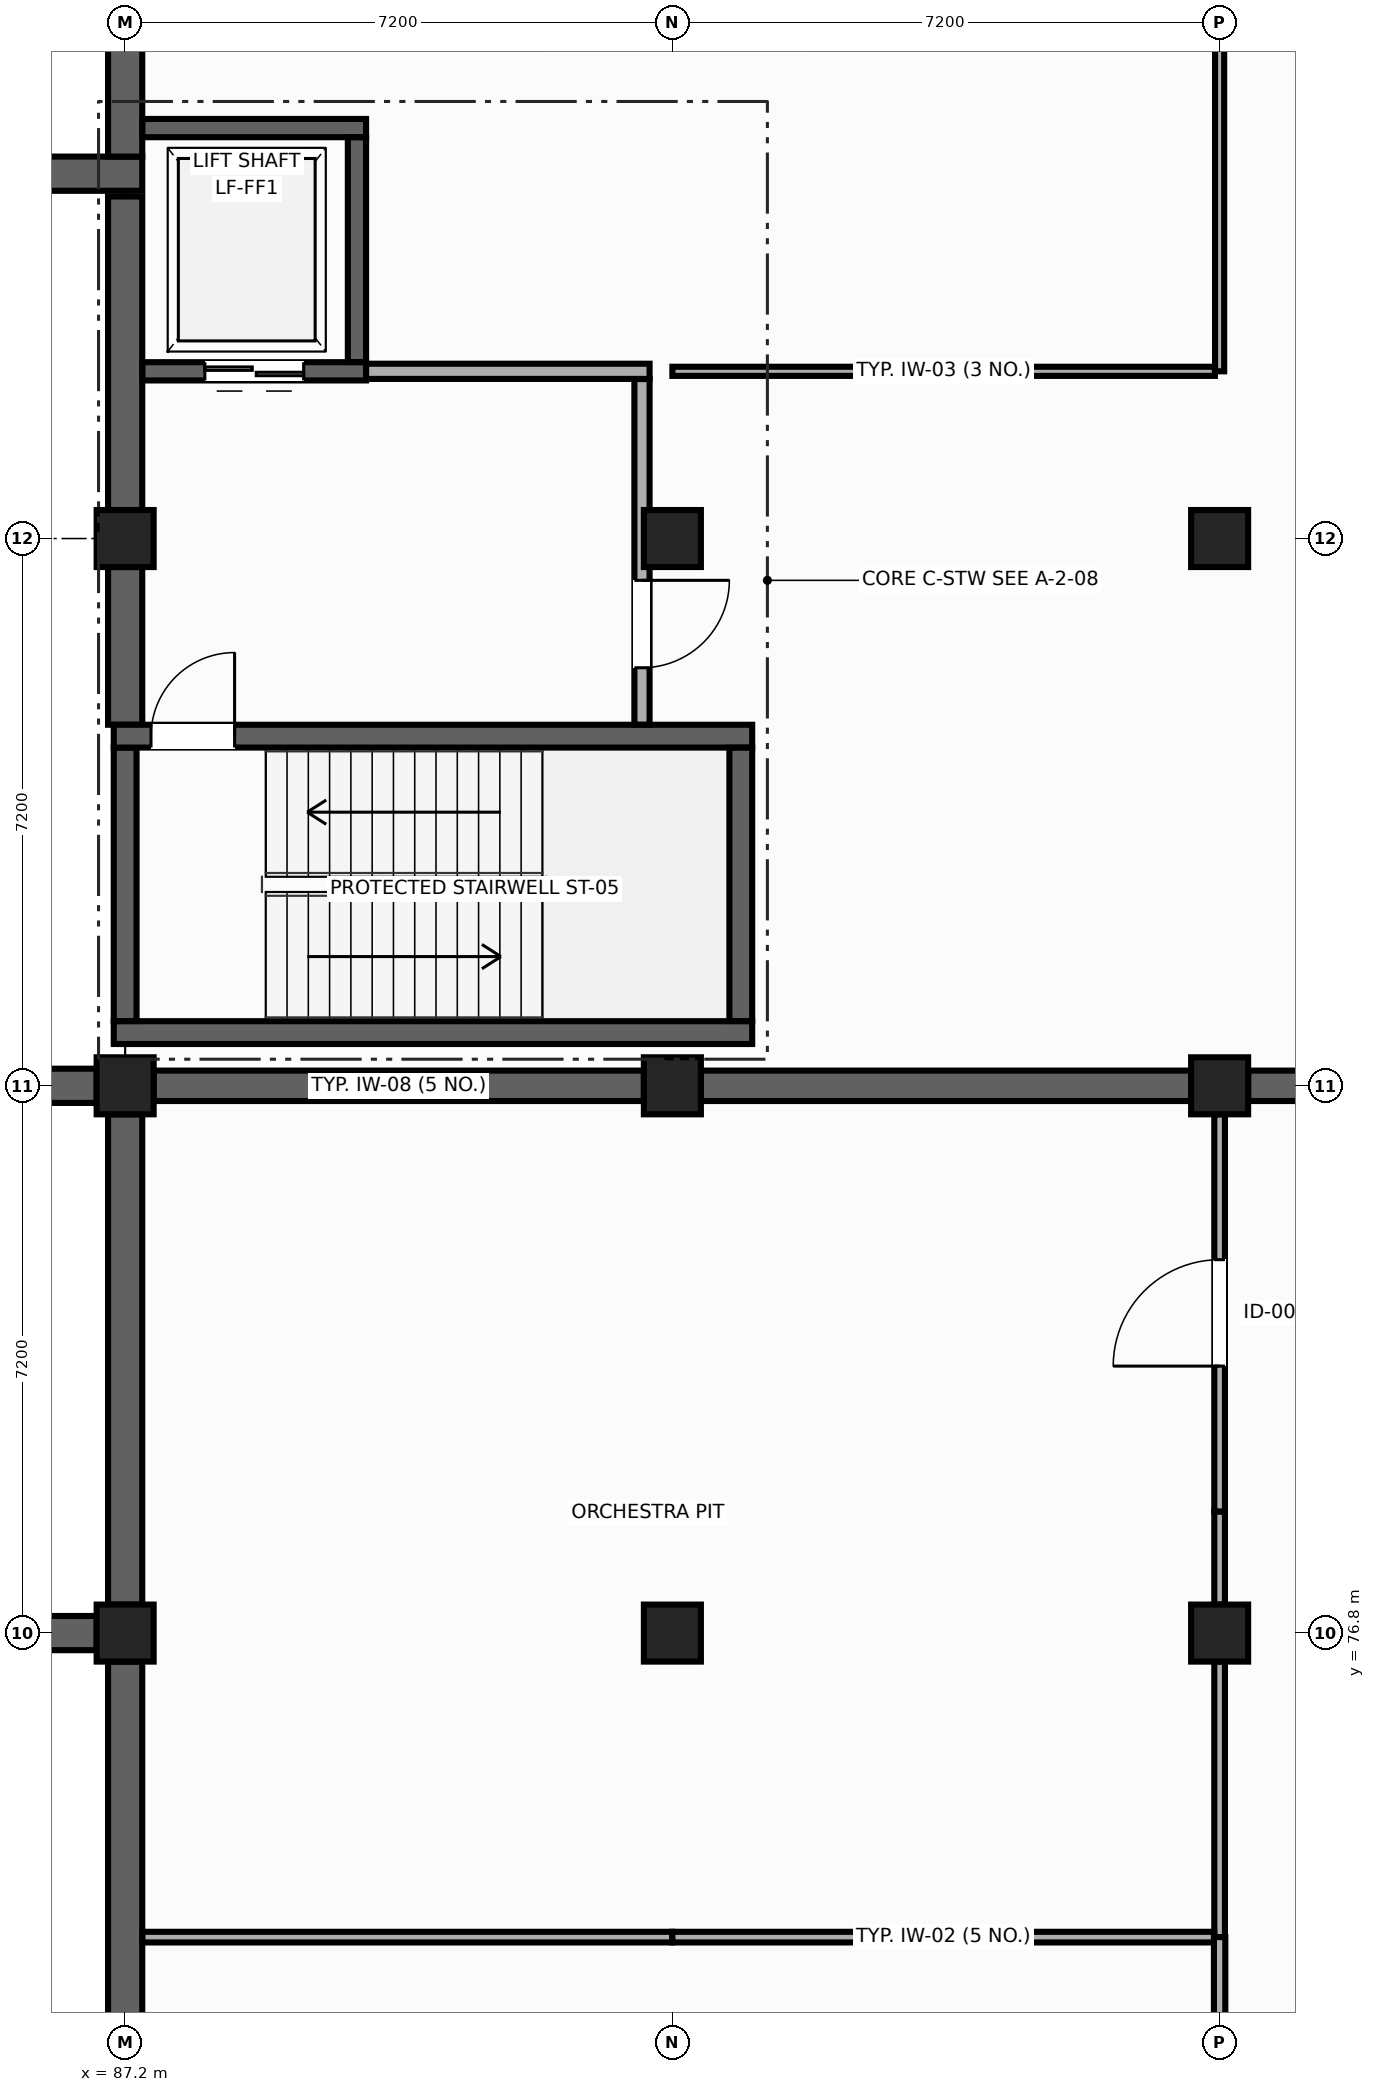
"""IFC4 building model, lengths in metres.
Left out: names, types, materials, properties, quantities, classifications, styles, units other than length and angle.
Written with IfcOpenShell. Run it as: python <this file> out.ifc"""

import sys

from ifc_helpers import new_model, si_unit, direction, frame, frame_2d, origin, origin_2d, place, context, subcontext, project, spatial, rectangle, extrude, element, fill, save


model = new_model("IFC4")
c1 = context("Model", 3, precision=1e-05, world=origin(), true_north=direction((0.0, 1.0)))
c2 = subcontext(c1, "Body", "Model", "MODEL_VIEW")
j1 = project(units=[si_unit("LENGTHUNIT", "METRE"), si_unit("PLANEANGLEUNIT", "RADIAN")], contexts=[c1])
p1 = place(None, origin())
s1 = spatial("IfcSite", under=j1, at=p1, CompositionType="ELEMENT")
p2 = place(p1, origin())
s2 = spatial("IfcBuilding", under=s1, at=p2, CompositionType="ELEMENT")
p3 = place(p2, frame((0.0, 0.0, -4.8)))
s3 = spatial("IfcBuildingStorey", under=s2, at=p3, CompositionType="ELEMENT", Elevation=-4.8)
p4 = place(p3, frame((87.2, 76.8, 0.0), z_axis=(0.0, 0.0, 1.0), x_axis=(1.0, 0.0, 0.0)))
e1 = element("IfcColumn", 1, at=p4, inside=s3, PredefinedType="COLUMN", context=c2, shape_type="SweptSolid", body=[
    extrude(rectangle(XDim=0.75, YDim=0.75, at=origin_2d()), origin(), (0.0, 0.0, 1.0), 4.8),
])
for number, where, z_axis, x_axis in (
    (2, (94.4, 76.8, 0.0), (0.0, 0.0, 1.0), (0.0, 1.0, 0.0)),
    (3, (101.6, 76.8, 0.0), (0.0, 0.0, 1.0), (1.0, 0.0, 0.0)),
):
    element("IfcColumn", number, at=place(p3, frame(where, z_axis=z_axis, x_axis=x_axis)), inside=s3, PredefinedType="COLUMN", context=c2, shape_type="SweptSolid", body=[
        extrude(rectangle(XDim=0.75, YDim=0.75, at=origin_2d()), origin(), (0.0, 0.0, 1.0), 4.45),
    ])
for number, where, z_axis, x_axis in (
    (4, (87.2, 84.0, 0.0), (0.0, 0.0, 1.0), (0.0, 1.0, 0.0)),
    (5, (94.4, 84.0, 0.0), (0.0, 0.0, 1.0), (1.0, 0.0, 0.0)),
    (6, (101.6, 84.0, 0.0), (0.0, 0.0, 1.0), (0.0, 1.0, 0.0)),
    (7, (87.2, 91.2, 0.0), (0.0, 0.0, 1.0), (1.0, 0.0, 0.0)),
):
    element("IfcColumn", number, at=place(p3, frame(where, z_axis=z_axis, x_axis=x_axis)), inside=s3, PredefinedType="COLUMN", context=c2, shape_type="SweptSolid", body=[
        extrude(rectangle(XDim=0.75, YDim=0.75, at=origin_2d()), origin(), (0.0, 0.0, 1.0), 4.8),
    ])
for number, where, z_axis, x_axis in (
    (8, (94.4, 91.2, 0.0), (0.0, 0.0, 1.0), (0.0, 1.0, 0.0)),
    (9, (101.6, 91.2, 0.0), (0.0, 0.0, 1.0), (1.0, 0.0, 0.0)),
):
    element("IfcColumn", number, at=place(p3, frame(where, z_axis=z_axis, x_axis=x_axis)), inside=s3, PredefinedType="COLUMN", context=c2, shape_type="SweptSolid", body=[
        extrude(rectangle(XDim=0.75, YDim=0.75, at=origin_2d()), origin(), (0.0, 0.0, 1.0), 4.42),
    ])
p5 = place(p3, frame((80.375, 76.8, 0.0), z_axis=(0.0, 0.0, 1.0), x_axis=(1.0, 0.0, 0.0)))
e10 = element("IfcWall", 10, at=p5, inside=s3, PredefinedType="SHEAR", context=c2, shape_type="SweptSolid", body=[
    extrude(rectangle(XDim=6.45, YDim=0.45, at=frame_2d((3.225, 0.0))), origin(), (0.0, 0.0, 1.0), 4.5),
])
p6 = place(p3, frame((87.2, 77.175, 0.0), z_axis=(0.0, 0.0, 1.0), x_axis=(0.0, 1.0, 0.0)))
e11 = element("IfcWall", 11, at=p6, inside=s3, PredefinedType="SHEAR", context=c2, shape_type="SweptSolid", body=[
    extrude(rectangle(XDim=6.45, YDim=0.45, at=frame_2d((3.225, 0.0))), origin(), (0.0, 0.0, 1.0), 4.45),
])
p7 = place(p3, frame((86.825, 84.0, 0.0), z_axis=(0.0, 0.0, 1.0), x_axis=(-1.0, 0.0, 0.0)))
e12 = element("IfcWall", 12, at=p7, inside=s3, PredefinedType="SHEAR", context=c2, shape_type="SweptSolid", body=[
    extrude(rectangle(XDim=4.65, YDim=0.45, at=frame_2d((2.325, 0.0))), origin(), (0.0, 0.0, 1.0), 4.55),
])
p8 = place(p3, frame((82.175, 96.0, 0.0), z_axis=(0.0, 0.0, 1.0), x_axis=(1.0, 0.0, 0.0)))
e13 = element("IfcWall", 13, at=p8, inside=s3, PredefinedType="SHEAR", context=c2, shape_type="SweptSolid", body=[
    extrude(rectangle(XDim=5.25, YDim=0.45, at=frame_2d((2.625, 0.0))), origin(), (0.0, 0.0, 1.0), 4.55),
])
p9 = place(p3, frame((87.2, 96.225, 0.0), z_axis=(0.0, 0.0, 1.0), x_axis=(0.0, 1.0, 0.0)))
e14 = element("IfcWall", 14, at=p9, inside=s3, PredefinedType="SHEAR", context=c2, shape_type="SweptSolid", body=[
    extrude(rectangle(XDim=1.8, YDim=0.45, at=frame_2d((0.9, 0.0))), origin(), (0.0, 0.0, 1.0), 4.42),
])
p10 = place(p3, frame((87.2, 69.975, 0.0), z_axis=(0.0, 0.0, 1.0), x_axis=(0.0, 1.0, 0.0)))
e15 = element("IfcWall", 15, at=p10, inside=s3, PredefinedType="SHEAR", context=c2, shape_type="SweptSolid", body=[
    extrude(rectangle(XDim=6.45, YDim=0.45, at=frame_2d((3.225, 0.0))), origin(), (0.0, 0.0, 1.0), 4.45),
])
p11 = place(p3, frame((87.2, 88.75, 0.0), z_axis=(0.0, 0.0, 1.0), x_axis=(0.0, 1.0, 0.0)))
e16 = element("IfcWall", 16, at=p11, inside=s3, PredefinedType="SHEAR", context=c2, shape_type="SweptSolid", body=[
    extrude(rectangle(XDim=2.075, YDim=0.45, at=frame_2d((1.038, 0.0))), origin(), (0.0, 0.0, 1.0), 4.42),
])
p12 = place(p3, frame((87.2, 91.575, 0.0), z_axis=(0.0, 0.0, 1.0), x_axis=(0.0, 1.0, 0.0)))
e17 = element("IfcWall", 17, at=p12, inside=s3, PredefinedType="SHEAR", context=c2, shape_type="SweptSolid", body=[
    extrude(rectangle(XDim=4.125, YDim=0.45, at=frame_2d((2.062, 0.0))), origin(), (0.0, 0.0, 1.0), 4.42),
])
p13 = place(p3, frame((95.45, 84.7, 0.0), z_axis=(0.0, 0.0, 1.0), x_axis=(-1.0, 0.0, 0.0)))
e18 = element("IfcWall", 18, at=p13, inside=s3, PredefinedType="SHEAR", context=c2, shape_type="SweptSolid", body=[
    extrude(rectangle(XDim=8.4, YDim=0.3, at=frame_2d((4.2, 0.0))), origin(), (0.0, 0.0, 1.0), 4.42),
])
p14 = place(p3, frame((87.2, 84.852, 0.0), z_axis=(0.0, 0.0, 1.0), x_axis=(0.0, 1.0, 0.0)))
e19 = element("IfcWall", 19, at=p14, inside=s3, PredefinedType="SHEAR", context=c2, shape_type="SweptSolid", body=[
    extrude(rectangle(XDim=3.598, YDim=0.3, at=frame_2d((1.799, 0.0))), origin(), (0.0, 0.0, 1.0), 4.42),
])
p15 = place(p3, frame((87.05, 88.6, 0.0), z_axis=(0.0, 0.0, 1.0), x_axis=(1.0, 0.0, 0.0)))
e20 = element("IfcWall", 20, at=p15, inside=s3, PredefinedType="SHEAR", context=c2, shape_type="SweptSolid", body=[
    extrude(rectangle(XDim=8.4, YDim=0.3, at=frame_2d((4.2, 0.0))), origin(), (0.0, 0.0, 1.0), 4.42),
])
p16 = place(p15, frame((0.49, 0.0, 0.0)))
e21 = element("IfcOpeningElement", 21, at=p16, cuts=e20, PredefinedType="OPENING", context=c2, shape_type="SweptSolid", body=[
    extrude(rectangle(XDim=1.1, YDim=2.15, at=frame_2d((0.55, 1.075))), frame((0.0, 0.16, 0.0), z_axis=(0.0, -1.0, 0.0), x_axis=(1.0, 0.0, 0.0)), (0.0, 0.0, 1.0), 0.32),
])
p17 = place(p3, frame((95.3, 88.448, 0.0), z_axis=(0.0, 0.0, 1.0), x_axis=(0.0, -1.0, 0.0)))
e22 = element("IfcWall", 22, at=p17, inside=s3, PredefinedType="SHEAR", context=c2, shape_type="SweptSolid", body=[
    extrude(rectangle(XDim=3.596, YDim=0.3, at=frame_2d((1.798, 0.0))), origin(), (0.0, 0.0, 1.0), 4.42),
])
p18 = place(p3, frame((90.37, 93.4, 0.0), z_axis=(0.0, 0.0, 1.0), x_axis=(-1.0, 0.0, 0.0)))
e23 = element("IfcWall", 23, at=p18, inside=s3, PredefinedType="SHEAR", context=c2, shape_type="SweptSolid", body=[
    extrude(rectangle(XDim=2.943, YDim=0.24, at=frame_2d((1.472, 0.0))), origin(), (0.0, 0.0, 1.0), 4.42),
])
p19 = place(p18, frame((0.822, 0.0, 0.0)))
e24 = element("IfcOpeningElement", 24, at=p19, cuts=e23, PredefinedType="OPENING", context=c2, shape_type="SweptSolid", body=[
    extrude(rectangle(XDim=1.3, YDim=2.15, at=frame_2d((0.65, 1.075))), frame((0.0, 0.13, 0.0), z_axis=(0.0, -1.0, 0.0), x_axis=(1.0, 0.0, 0.0)), (0.0, 0.0, 1.0), 0.26),
])
p20 = place(p3, frame((87.427, 96.6, 0.0), z_axis=(0.0, 0.0, 1.0), x_axis=(1.0, 0.0, 0.0)))
e25 = element("IfcWall", 25, at=p20, inside=s3, PredefinedType="SHEAR", context=c2, shape_type="SweptSolid", body=[
    extrude(rectangle(XDim=2.943, YDim=0.24, at=frame_2d((1.472, 0.0))), origin(), (0.0, 0.0, 1.0), 4.42),
])
p21 = place(p3, frame((90.25, 96.478, 0.0), z_axis=(0.0, 0.0, 1.0), x_axis=(0.0, -1.0, 0.0)))
e26 = element("IfcWall", 26, at=p21, inside=s3, PredefinedType="SHEAR", context=c2, shape_type="SweptSolid", body=[
    extrude(rectangle(XDim=2.956, YDim=0.24, at=frame_2d((1.478, 0.0))), origin(), (0.0, 0.0, 1.0), 4.42),
])
p22 = place(p3, frame((90.37, 93.4, 0.0), z_axis=(0.0, 0.0, 1.0), x_axis=(1.0, 0.0, 0.0)))
e27 = element("IfcWall", 27, at=p22, inside=s3, PredefinedType="PARTITIONING", context=c2, shape_type="SweptSolid", body=[
    extrude(rectangle(XDim=3.73, YDim=0.2, at=frame_2d((1.865, 0.0))), origin(), (0.0, 0.0, 1.0), 4.42),
])
p23 = place(p3, frame((94.0, 93.298, 0.0), z_axis=(0.0, 0.0, 1.0), x_axis=(0.0, -1.0, 0.0)))
e28 = element("IfcWall", 28, at=p23, inside=s3, PredefinedType="PARTITIONING", context=c2, shape_type="SweptSolid", body=[
    extrude(rectangle(XDim=4.546, YDim=0.2, at=frame_2d((2.273, 0.0))), origin(), (0.0, 0.0, 1.0), 3.015),
])
p24 = place(p23, frame((2.648, 0.0, 0.0)))
e29 = element("IfcOpeningElement", 29, at=p24, cuts=e28, PredefinedType="OPENING", context=c2, shape_type="SweptSolid", body=[
    extrude(rectangle(XDim=1.15, YDim=2.15, at=frame_2d((0.575, 1.075))), frame((0.0, 0.11, 0.0), z_axis=(0.0, -1.0, 0.0), x_axis=(1.0, 0.0, 0.0)), (0.0, 0.0, 1.0), 0.22),
])
p25 = place(p3, frame((87.575, 84.0, 0.0), z_axis=(0.0, 0.0, 1.0), x_axis=(1.0, 0.0, 0.0)))
e30 = element("IfcWall", 30, at=p25, inside=s3, PredefinedType="SHEAR", context=c2, shape_type="SweptSolid", body=[
    extrude(rectangle(XDim=6.45, YDim=0.4, at=frame_2d((3.225, 0.0))), origin(), (0.0, 0.0, 1.0), 4.42),
])
p26 = place(p3, frame((94.775, 84.0, 0.0), z_axis=(0.0, 0.0, 1.0), x_axis=(1.0, 0.0, 0.0)))
e31 = element("IfcWall", 31, at=p26, inside=s3, PredefinedType="SHEAR", context=c2, shape_type="SweptSolid", body=[
    extrude(rectangle(XDim=6.45, YDim=0.4, at=frame_2d((3.225, 0.0))), origin(), (0.0, 0.0, 1.0), 4.42),
])
p27 = place(p3, frame((101.975, 84.0, 0.0), z_axis=(0.0, 0.0, 1.0), x_axis=(1.0, 0.0, 0.0)))
e32 = element("IfcWall", 32, at=p27, inside=s3, PredefinedType="SHEAR", context=c2, shape_type="SweptSolid", body=[
    extrude(rectangle(XDim=6.45, YDim=0.4, at=frame_2d((3.225, 0.0))), origin(), (0.0, 0.0, 1.0), 4.42),
])
p28 = place(p27, frame((2.65, 0.0, 0.0)))
e33 = element("IfcOpeningElement", 33, at=p28, cuts=e32, PredefinedType="OPENING", context=c2, shape_type="SweptSolid", body=[
    extrude(rectangle(XDim=1.15, YDim=2.15, at=frame_2d((0.575, 1.075))), frame((0.0, 0.21, 0.0), z_axis=(0.0, -1.0, 0.0), x_axis=(1.0, 0.0, 0.0)), (0.0, 0.0, 1.0), 0.42),
])
p29 = place(p3, frame((101.6, 72.8, 0.0), z_axis=(0.0, 0.0, 1.0), x_axis=(0.0, 1.0, 0.0)))
e34 = element("IfcWall", 34, at=p29, inside=s3, PredefinedType="PARTITIONING", context=c2, shape_type="SweptSolid", body=[
    extrude(rectangle(XDim=3.625, YDim=0.14, at=frame_2d((1.812, 0.0))), origin(), (0.0, 0.0, 1.0), 3.645),
])
p30 = place(p3, frame((101.6, 77.175, 0.0), z_axis=(0.0, 0.0, 1.0), x_axis=(0.0, 1.0, 0.0)))
e35 = element("IfcWall", 35, at=p30, inside=s3, PredefinedType="PARTITIONING", context=c2, shape_type="SweptSolid", body=[
    extrude(rectangle(XDim=1.225, YDim=0.14, at=frame_2d((0.612, 0.0))), origin(), (0.0, 0.0, 1.0), 3.645),
])
p31 = place(p3, frame((101.6, 78.4, 0.0), z_axis=(0.0, 0.0, 1.0), x_axis=(0.0, 1.0, 0.0)))
e36 = element("IfcWall", 36, at=p31, inside=s3, PredefinedType="PARTITIONING", context=c2, shape_type="SweptSolid", body=[
    extrude(rectangle(XDim=5.225, YDim=0.14, at=frame_2d((2.613, 0.0))), origin(), (0.0, 0.0, 1.0), 3.645),
])
p32 = place(p31, frame((1.913, 0.0, 0.0)))
e37 = element("IfcOpeningElement", 37, at=p32, cuts=e36, PredefinedType="OPENING", context=c2, shape_type="SweptSolid", body=[
    extrude(rectangle(XDim=1.4, YDim=2.2, at=frame_2d((0.7, 1.1))), frame((0.0, 0.08, 0.0), z_axis=(0.0, -1.0, 0.0), x_axis=(1.0, 0.0, 0.0)), (0.0, 0.0, 1.0), 0.16),
])
p33 = place(p3, frame((87.427, 72.8, 0.0), z_axis=(0.0, 0.0, 1.0), x_axis=(1.0, 0.0, 0.0)))
e38 = element("IfcWall", 38, at=p33, inside=s3, PredefinedType="PARTITIONING", context=c2, shape_type="SweptSolid", body=[
    extrude(rectangle(XDim=6.973, YDim=0.14, at=frame_2d((3.486, 0.0))), origin(), (0.0, 0.0, 1.0), 3.645),
])
p34 = place(p3, frame((94.4, 72.8, 0.0), z_axis=(0.0, 0.0, 1.0), x_axis=(1.0, 0.0, 0.0)))
e39 = element("IfcWall", 39, at=p34, inside=s3, PredefinedType="PARTITIONING", context=c2, shape_type="SweptSolid", body=[
    extrude(rectangle(XDim=7.128, YDim=0.14, at=frame_2d((3.564, 0.0))), origin(), (0.0, 0.0, 1.0), 3.645),
])
p35 = place(p3, frame((101.6, 93.4, 0.0), z_axis=(0.0, 0.0, 1.0), x_axis=(0.0, 1.0, 0.0)))
e40 = element("IfcWall", 40, at=p35, inside=s3, PredefinedType="PARTITIONING", context=c2, shape_type="SweptSolid", body=[
    extrude(rectangle(XDim=4.625, YDim=0.12, at=frame_2d((2.312, 0.0))), origin(), (0.0, 0.0, 1.0), 3.615),
])
p36 = place(p3, frame((94.4, 93.4, 0.0), z_axis=(0.0, 0.0, 1.0), x_axis=(1.0, 0.0, 0.0)))
e41 = element("IfcWall", 41, at=p36, inside=s3, PredefinedType="PARTITIONING", context=c2, shape_type="SweptSolid", body=[
    extrude(rectangle(XDim=7.138, YDim=0.12, at=frame_2d((3.569, 0.0))), origin(), (0.0, 0.0, 1.0), 3.615),
])
p37 = place(p3, frame((101.6, 69.975, 0.0), z_axis=(0.0, 0.0, 1.0), x_axis=(0.0, 1.0, 0.0)))
e42 = element("IfcWall", 42, at=p37, inside=s3, PredefinedType="PARTITIONING", context=c2, shape_type="SweptSolid", body=[
    extrude(rectangle(XDim=2.825, YDim=0.15, at=frame_2d((1.413, 0.0))), origin(), (0.0, 0.0, 1.0), 3.645),
])
p38 = place(p16, origin())
e43 = element("IfcDoor", 43, at=p38, inside=s3, OperationType="SINGLE_SWING_RIGHT", PredefinedType="DOOR", context=c2, shape_type="SweptSolid", body=[
    extrude(rectangle(XDim=1.1, YDim=2.15, at=frame_2d((0.55, 1.075))), frame((0.0, 0.025, 0.0), z_axis=(0.0, -1.0, 0.0), x_axis=(1.0, 0.0, 0.0)), (0.0, 0.0, 1.0), 0.05),
])
fill(e21, e43)
p39 = place(p19, origin())
e44 = element("IfcDoor", 44, at=p39, inside=s3, OperationType="DOUBLE_DOOR_SLIDING", PredefinedType="DOOR", context=c2, shape_type="SweptSolid", body=[
    extrude(rectangle(XDim=1.3, YDim=2.15, at=frame_2d((0.65, 1.075))), frame((0.0, 0.025, 0.0), z_axis=(0.0, -1.0, 0.0), x_axis=(1.0, 0.0, 0.0)), (0.0, 0.0, 1.0), 0.05),
])
fill(e24, e44)
p40 = place(p24, origin())
e45 = element("IfcDoor", 45, at=p40, inside=s3, OperationType="SINGLE_SWING_LEFT", PredefinedType="DOOR", context=c2, shape_type="SweptSolid", body=[
    extrude(rectangle(XDim=1.15, YDim=2.15, at=frame_2d((0.575, 1.075))), frame((0.0, 0.025, 0.0), z_axis=(0.0, -1.0, 0.0), x_axis=(1.0, 0.0, 0.0)), (0.0, 0.0, 1.0), 0.05),
])
fill(e29, e45)
p41 = place(p32, origin())
e46 = element("IfcDoor", 46, at=p41, inside=s3, OperationType="SINGLE_SWING_LEFT", PredefinedType="DOOR", context=c2, shape_type="SweptSolid", body=[
    extrude(rectangle(XDim=1.4, YDim=2.2, at=frame_2d((0.7, 1.1))), frame((0.0, 0.025, 0.0), z_axis=(0.0, -1.0, 0.0), x_axis=(1.0, 0.0, 0.0)), (0.0, 0.0, 1.0), 0.05),
])
fill(e37, e46)
save(model, sys.argv[1])
